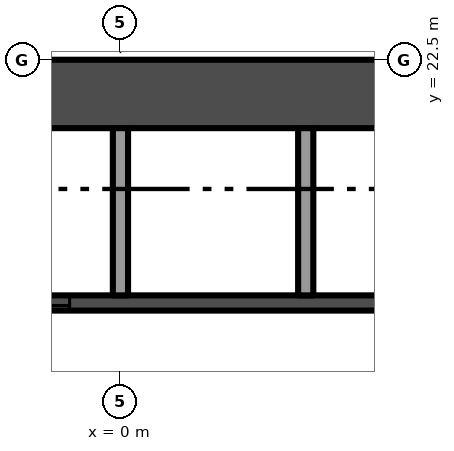
"""IFC4 building model, lengths in metres.
Left out: names, types, materials, properties, quantities, classifications, styles, units other than length and angle.
Written with IfcOpenShell. Run it as: python <this file> out.ifc"""

import sys

from ifc_helpers import new_model, si_unit, direction, frame, frame_2d, origin, place, context, subcontext, project, spatial, rectangle, extrude, element, fill, save


model = new_model("IFC4")
c1 = context("Model", 3, precision=1e-05, world=origin(), true_north=direction((0.0, 1.0)))
c2 = subcontext(c1, "Body", "Model", "MODEL_VIEW")
j1 = project(units=[si_unit("LENGTHUNIT", "METRE"), si_unit("PLANEANGLEUNIT", "RADIAN")], contexts=[c1])
p1 = place(None, origin())
s1 = spatial("IfcSite", under=j1, at=p1, CompositionType="ELEMENT")
p2 = place(p1, origin())
s2 = spatial("IfcBuilding", under=s1, at=p2, CompositionType="ELEMENT")
p3 = place(p2, frame((0.0, 0.0, 103.6)))
s3 = spatial("IfcBuildingStorey", under=s2, at=p3, CompositionType="ELEMENT", Elevation=103.6)
p4 = place(p3, frame((13.5, 22.05, -0.3), z_axis=(0.0, 0.0, 1.0), x_axis=(-1.0, 0.0, 0.0)))
e1 = element("IfcWall", 1, at=p4, inside=s3, PredefinedType="SHEAR", context=c2, shape_type="SweptSolid", body=[
    extrude(rectangle(XDim=27.0, YDim=0.9, at=frame_2d((13.5, 0.0))), origin(), (0.0, 0.0, 1.0), 3.8),
])
p5 = place(p3, frame((-9.85, 19.3, 0.0), z_axis=(0.0, 0.0, 1.0), x_axis=(1.0, 0.0, 0.0)))
e2 = element("IfcWall", 2, at=p5, inside=s3, PredefinedType="SHEAR", context=c2, shape_type="SweptSolid", body=[
    extrude(rectangle(XDim=19.7, YDim=0.2, at=frame_2d((9.85, 0.0))), origin(), (0.0, 0.0, 1.0), 3.5),
])
p6 = place(p5, frame((0.769, 0.0, 0.0)))
e3 = element("IfcOpeningElement", 3, at=p6, cuts=e2, PredefinedType="OPENING", context=c2, shape_type="SweptSolid", body=[
    extrude(rectangle(XDim=1.1, YDim=2.1, at=frame_2d((0.55, 1.05))), frame((0.0, 0.11, 0.0), z_axis=(0.0, -1.0, 0.0), x_axis=(1.0, 0.0, 0.0)), (0.0, 0.0, 1.0), 0.22),
])
p7 = place(p5, frame((3.206, 0.0, 0.0)))
e4 = element("IfcOpeningElement", 4, at=p7, cuts=e2, PredefinedType="OPENING", context=c2, shape_type="SweptSolid", body=[
    extrude(rectangle(XDim=1.1, YDim=2.1, at=frame_2d((0.55, 1.05))), frame((0.0, 0.11, 0.0), z_axis=(0.0, -1.0, 0.0), x_axis=(1.0, 0.0, 0.0)), (0.0, 0.0, 1.0), 0.22),
])
p8 = place(p5, frame((5.644, 0.0, 0.0)))
e5 = element("IfcOpeningElement", 5, at=p8, cuts=e2, PredefinedType="OPENING", context=c2, shape_type="SweptSolid", body=[
    extrude(rectangle(XDim=1.1, YDim=2.1, at=frame_2d((0.55, 1.05))), frame((0.0, 0.11, 0.0), z_axis=(0.0, -1.0, 0.0), x_axis=(1.0, 0.0, 0.0)), (0.0, 0.0, 1.0), 0.22),
])
p9 = place(p5, frame((8.081, 0.0, 0.0)))
e6 = element("IfcOpeningElement", 6, at=p9, cuts=e2, PredefinedType="OPENING", context=c2, shape_type="SweptSolid", body=[
    extrude(rectangle(XDim=1.1, YDim=2.1, at=frame_2d((0.55, 1.05))), frame((0.0, 0.11, 0.0), z_axis=(0.0, -1.0, 0.0), x_axis=(1.0, 0.0, 0.0)), (0.0, 0.0, 1.0), 0.22),
])
for number, where, z_axis, x_axis in (
    (7, (0.0, 19.4, 0.0), (0.0, 0.0, 1.0), (0.0, 1.0, 0.0)),
    (8, (2.438, 19.4, 0.0), (0.0, 0.0, 1.0), (0.0, 1.0, 0.0)),
):
    element("IfcWall", number, at=place(p3, frame(where, z_axis=z_axis, x_axis=x_axis)), inside=s3, PredefinedType="PARTITIONING", context=c2, shape_type="SweptSolid", body=[
        extrude(rectangle(XDim=2.2, YDim=0.2, at=frame_2d((1.1, 0.0))), origin(), (0.0, 0.0, 1.0), 3.5),
    ])
p10 = place(p9, origin())
e9 = element("IfcDoor", 9, at=p10, inside=s3, OperationType="SLIDING_TO_LEFT", PredefinedType="DOOR", context=c2, shape_type="SweptSolid", body=[
    extrude(rectangle(XDim=1.1, YDim=2.1, at=frame_2d((0.55, 1.05))), frame((0.0, 0.025, 0.0), z_axis=(0.0, -1.0, 0.0), x_axis=(1.0, 0.0, 0.0)), (0.0, 0.0, 1.0), 0.05),
])
fill(e6, e9)
save(model, sys.argv[1])
